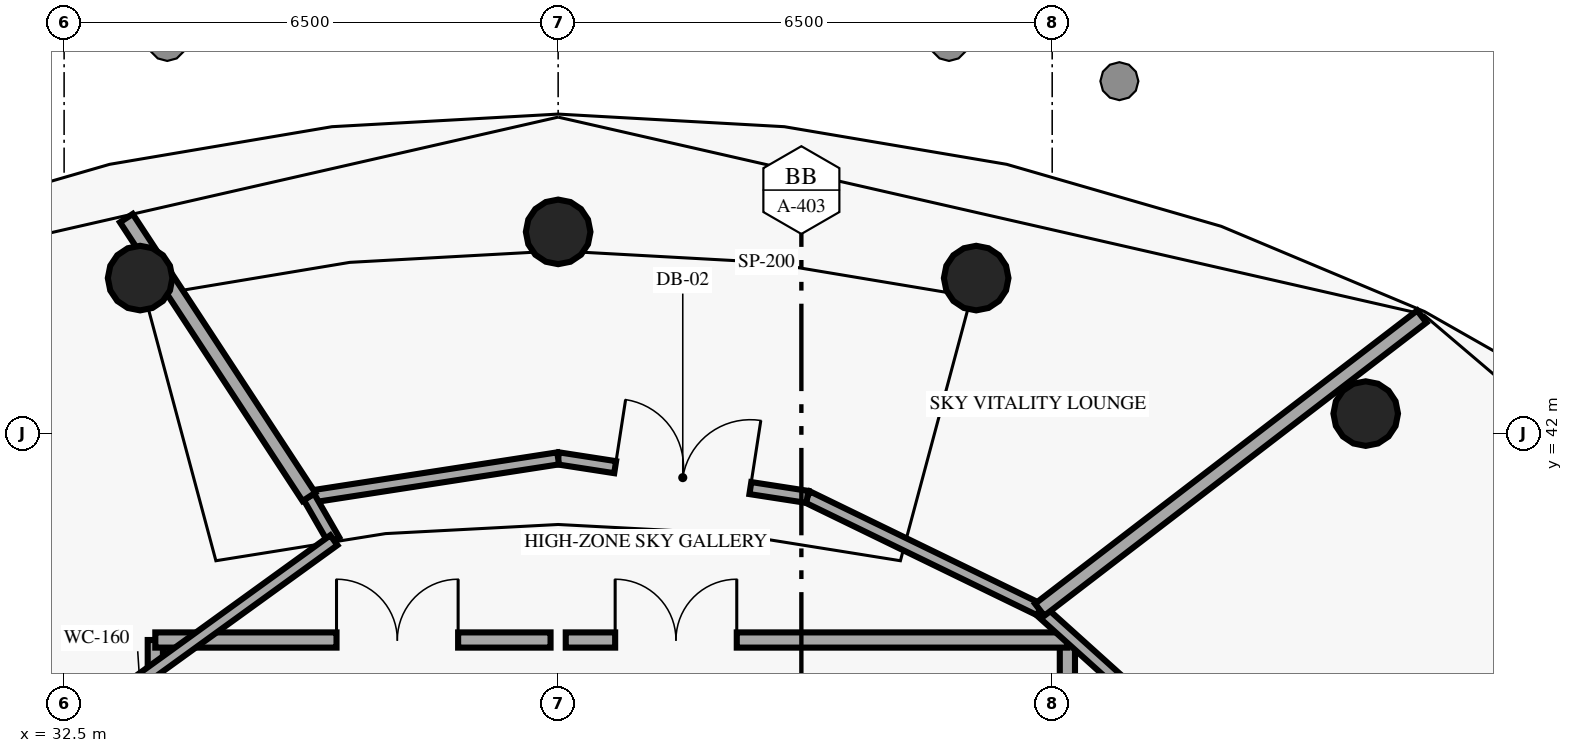
"""IFC4 building model, lengths in metres.
Left out: names, types, materials, properties, quantities, classifications, styles, units other than length and angle.
Written with IfcOpenShell. Run it as: python <this file> out.ifc"""

import sys

from ifc_helpers import new_model, si_unit, direction, frame, frame_2d, origin, origin_2d, place, context, subcontext, project, spatial, rectangle, circle, extrude, element, fill, save


model = new_model("IFC4")
c1 = context("Model", 3, precision=1e-05, world=origin(), true_north=direction((0.0, 1.0)))
c2 = subcontext(c1, "Body", "Model", "MODEL_VIEW")
j1 = project(units=[si_unit("LENGTHUNIT", "METRE"), si_unit("PLANEANGLEUNIT", "RADIAN")], contexts=[c1])
p1 = place(None, origin())
s1 = spatial("IfcSite", under=j1, at=p1, CompositionType="ELEMENT")
p2 = place(p1, origin())
s2 = spatial("IfcBuilding", under=s1, at=p2, CompositionType="ELEMENT")
p3 = place(p2, frame((0.0, 0.0, 203.15)))
s3 = spatial("IfcBuildingStorey", under=s2, at=p3, CompositionType="ELEMENT", Elevation=203.15)
for number, where, z_axis, x_axis in (
    (1, (49.625, 42.259, 0.0), (0.0, 0.0, 1.0), (1.0, 0.0, 0.0)),
    (2, (44.5, 44.042, 0.0), (0.0, 0.0, 1.0), (1.0, 0.0, 0.0)),
    (3, (39.0, 44.65, 0.0), (0.0, 0.0, 1.0), (1.0, 0.0, 0.0)),
    (4, (33.5, 44.042, 0.0), (0.0, 0.0, 1.0), (1.0, 0.0, 0.0)),
):
    element("IfcColumn", number, at=place(p3, frame(where, z_axis=z_axis, x_axis=x_axis)), inside=s3, PredefinedType="COLUMN", context=c2, shape_type="SweptSolid", body=[
        extrude(circle(Radius=0.425, at=origin_2d()), origin(), (0.0, 0.0, 1.0), 4.76),
    ])
for number, where, z_axis, x_axis in (
    (5, (33.7, 37.4, 0.0), (0.0, 0.0, 1.0), (0.0, 1.0, 0.0)),
    (6, (45.7, 37.4, 0.0), (0.0, 0.0, 1.0), (0.0, 1.0, 0.0)),
):
    element("IfcWall", number, at=place(p3, frame(where, z_axis=z_axis, x_axis=x_axis)), inside=s3, PredefinedType="SOLIDWALL", context=c2, shape_type="SweptSolid", body=[
        extrude(rectangle(XDim=1.88, YDim=0.2, at=frame_2d((0.94, 0.0))), origin(), (0.0, 0.0, 1.0), 4.76),
    ])
p4 = place(p3, frame((38.9, 39.28, 0.0), z_axis=(0.0, 0.0, 1.0), x_axis=(-1.0, 0.0, 0.0)))
e7 = element("IfcWall", 7, at=p4, inside=s3, PredefinedType="SOLIDWALL", context=c2, shape_type="SweptSolid", body=[
    extrude(rectangle(XDim=5.2, YDim=0.2, at=frame_2d((2.6, 0.0))), origin(), (0.0, 0.0, 1.0), 4.76),
])
p5 = place(p4, frame((1.216, 0.0, 0.0)))
e8 = element("IfcOpeningElement", 8, at=p5, cuts=e7, PredefinedType="OPENING", context=c2, shape_type="SweptSolid", body=[
    extrude(rectangle(XDim=1.6, YDim=2.2, at=frame_2d((0.8, 1.1))), frame((0.0, 0.11, 0.0), z_axis=(0.0, -1.0, 0.0), x_axis=(1.0, 0.0, 0.0)), (0.0, 0.0, 1.0), 0.22),
])
p6 = place(p3, frame((45.7, 39.28, 0.0), z_axis=(0.0, 0.0, 1.0), x_axis=(-1.0, 0.0, 0.0)))
e9 = element("IfcWall", 9, at=p6, inside=s3, PredefinedType="SOLIDWALL", context=c2, shape_type="SweptSolid", body=[
    extrude(rectangle(XDim=6.6, YDim=0.2, at=frame_2d((3.3, 0.0))), origin(), (0.0, 0.0, 1.0), 4.76),
])
p7 = place(p6, frame((4.35, 0.0, 0.0)))
e10 = element("IfcOpeningElement", 10, at=p7, cuts=e9, PredefinedType="OPENING", context=c2, shape_type="SweptSolid", body=[
    extrude(rectangle(XDim=1.6, YDim=2.2, at=frame_2d((0.8, 1.1))), frame((0.0, 0.11, 0.0), z_axis=(0.0, -1.0, 0.0), x_axis=(1.0, 0.0, 0.0)), (0.0, 0.0, 1.0), 0.22),
])
p8 = place(p3, frame((47.959, 37.315, 0.0), z_axis=(0.0, 0.0, 1.0), x_axis=(-0.743094720901, 0.669186248939, 0.0)))
e11 = element("IfcWall", 11, at=p8, inside=s3, PredefinedType="PARTITIONING", context=c2, shape_type="SweptSolid", body=[
    extrude(rectangle(XDim=3.531, YDim=0.16, at=frame_2d((1.766, 0.0))), origin(), (0.0, 0.0, 1.0), 4.76),
])
p9 = place(p3, frame((45.335, 39.678, 0.0), z_axis=(0.0, 0.0, 1.0), x_axis=(-0.899414545514, 0.437096642995, 0.0)))
e12 = element("IfcWall", 12, at=p9, inside=s3, PredefinedType="PARTITIONING", context=c2, shape_type="SweptSolid", body=[
    extrude(rectangle(XDim=3.398, YDim=0.16, at=frame_2d((1.699, 0.0))), origin(), (0.0, 0.0, 1.0), 4.76),
])
p10 = place(p3, frame((39.0, 41.67, 0.0), z_axis=(0.0, 0.0, 1.0), x_axis=(0.988264270775, -0.15275382519, 0.0)))
e13 = element("IfcWall", 13, at=p10, inside=s3, PredefinedType="PARTITIONING", context=c2, shape_type="SweptSolid", body=[
    extrude(rectangle(XDim=3.318, YDim=0.16, at=frame_2d((1.659, 0.0))), origin(), (0.0, 0.0, 1.0), 4.76),
])
p11 = place(p10, frame((0.759, 0.0, 0.0)))
e14 = element("IfcOpeningElement", 14, at=p11, cuts=e13, PredefinedType="OPENING", context=c2, shape_type="SweptSolid", body=[
    extrude(rectangle(XDim=1.8, YDim=2.3, at=frame_2d((0.9, 1.15))), frame((0.0, 0.09, 0.0), z_axis=(0.0, -1.0, 0.0), x_axis=(1.0, 0.0, 0.0)), (0.0, 0.0, 1.0), 0.18),
])
p12 = place(p3, frame((39.0, 41.67, 0.0), z_axis=(0.0, 0.0, 1.0), x_axis=(-0.988264270775, -0.15275382519, 0.0)))
e15 = element("IfcWall", 15, at=p12, inside=s3, PredefinedType="PARTITIONING", context=c2, shape_type="SweptSolid", body=[
    extrude(rectangle(XDim=3.318, YDim=0.16, at=frame_2d((1.659, 0.0))), origin(), (0.0, 0.0, 1.0), 4.76),
])
p13 = place(p3, frame((36.049, 40.593, 0.0), z_axis=(0.0, 0.0, 1.0), x_axis=(-0.498854625265, 0.866685677078, 0.0)))
e16 = element("IfcWall", 16, at=p13, inside=s3, PredefinedType="PARTITIONING", context=c2, shape_type="SweptSolid", body=[
    extrude(rectangle(XDim=0.658, YDim=0.16, at=frame_2d((0.329, 0.0))), origin(), (0.0, 0.0, 1.0), 4.76),
])
p14 = place(p3, frame((45.335, 39.678, 0.0), z_axis=(0.0, 0.0, 1.0), x_axis=(0.793373792652, 0.608734774046, 0.0)))
e17 = element("IfcWall", 17, at=p14, inside=s3, PredefinedType="PARTITIONING", context=c2, shape_type="SweptSolid", body=[
    extrude(rectangle(XDim=6.338, YDim=0.2, at=frame_2d((3.169, 0.0))), origin(), (0.0, 0.0, 1.0), 4.76),
])
p15 = place(p3, frame((35.721, 41.163, 0.0), z_axis=(0.0, 0.0, 1.0), x_axis=(-0.547819348022, 0.836596654268, 0.0)))
e18 = element("IfcWall", 18, at=p15, inside=s3, PredefinedType="PARTITIONING", context=c2, shape_type="SweptSolid", body=[
    extrude(rectangle(XDim=4.384, YDim=0.2, at=frame_2d((2.192, 0.0))), origin(), (0.0, 0.0, 1.0), 4.76),
])
p16 = place(p3, frame((36.049, 40.593, 0.0), z_axis=(0.0, 0.0, 1.0), x_axis=(-0.810271736342, -0.58605436035, 0.0)))
e19 = element("IfcWall", 19, at=p16, inside=s3, PredefinedType="PARTITIONING", context=c2, shape_type="SweptSolid", body=[
    extrude(rectangle(XDim=6.307, YDim=0.16, at=frame_2d((3.153, 0.0))), origin(), (0.0, 0.0, 1.0), 4.76),
])
p17 = place(p5, origin())
e20 = element("IfcDoor", 20, at=p17, inside=s3, OperationType="DOUBLE_DOOR_SINGLE_SWING", PredefinedType="DOOR", context=c2, shape_type="SweptSolid", body=[
    extrude(rectangle(XDim=1.6, YDim=2.2, at=frame_2d((0.8, 1.1))), frame((0.0, 0.025, 0.0), z_axis=(0.0, -1.0, 0.0), x_axis=(1.0, 0.0, 0.0)), (0.0, 0.0, 1.0), 0.05),
])
fill(e8, e20)
p18 = place(p7, origin())
e21 = element("IfcDoor", 21, at=p18, inside=s3, OperationType="DOUBLE_DOOR_SINGLE_SWING", PredefinedType="DOOR", context=c2, shape_type="SweptSolid", body=[
    extrude(rectangle(XDim=1.6, YDim=2.2, at=frame_2d((0.8, 1.1))), frame((0.0, 0.025, 0.0), z_axis=(0.0, -1.0, 0.0), x_axis=(1.0, 0.0, 0.0)), (0.0, 0.0, 1.0), 0.05),
])
fill(e10, e21)
p19 = place(p11, origin())
e22 = element("IfcDoor", 22, at=p19, inside=s3, OperationType="DOUBLE_DOOR_SINGLE_SWING", PredefinedType="DOOR", context=c2, shape_type="SweptSolid", body=[
    extrude(rectangle(XDim=1.8, YDim=2.3, at=frame_2d((0.9, 1.15))), frame((0.0, 0.025, 0.0), z_axis=(0.0, -1.0, 0.0), x_axis=(1.0, 0.0, 0.0)), (0.0, 0.0, 1.0), 0.05),
])
fill(e14, e22)
save(model, sys.argv[1])
